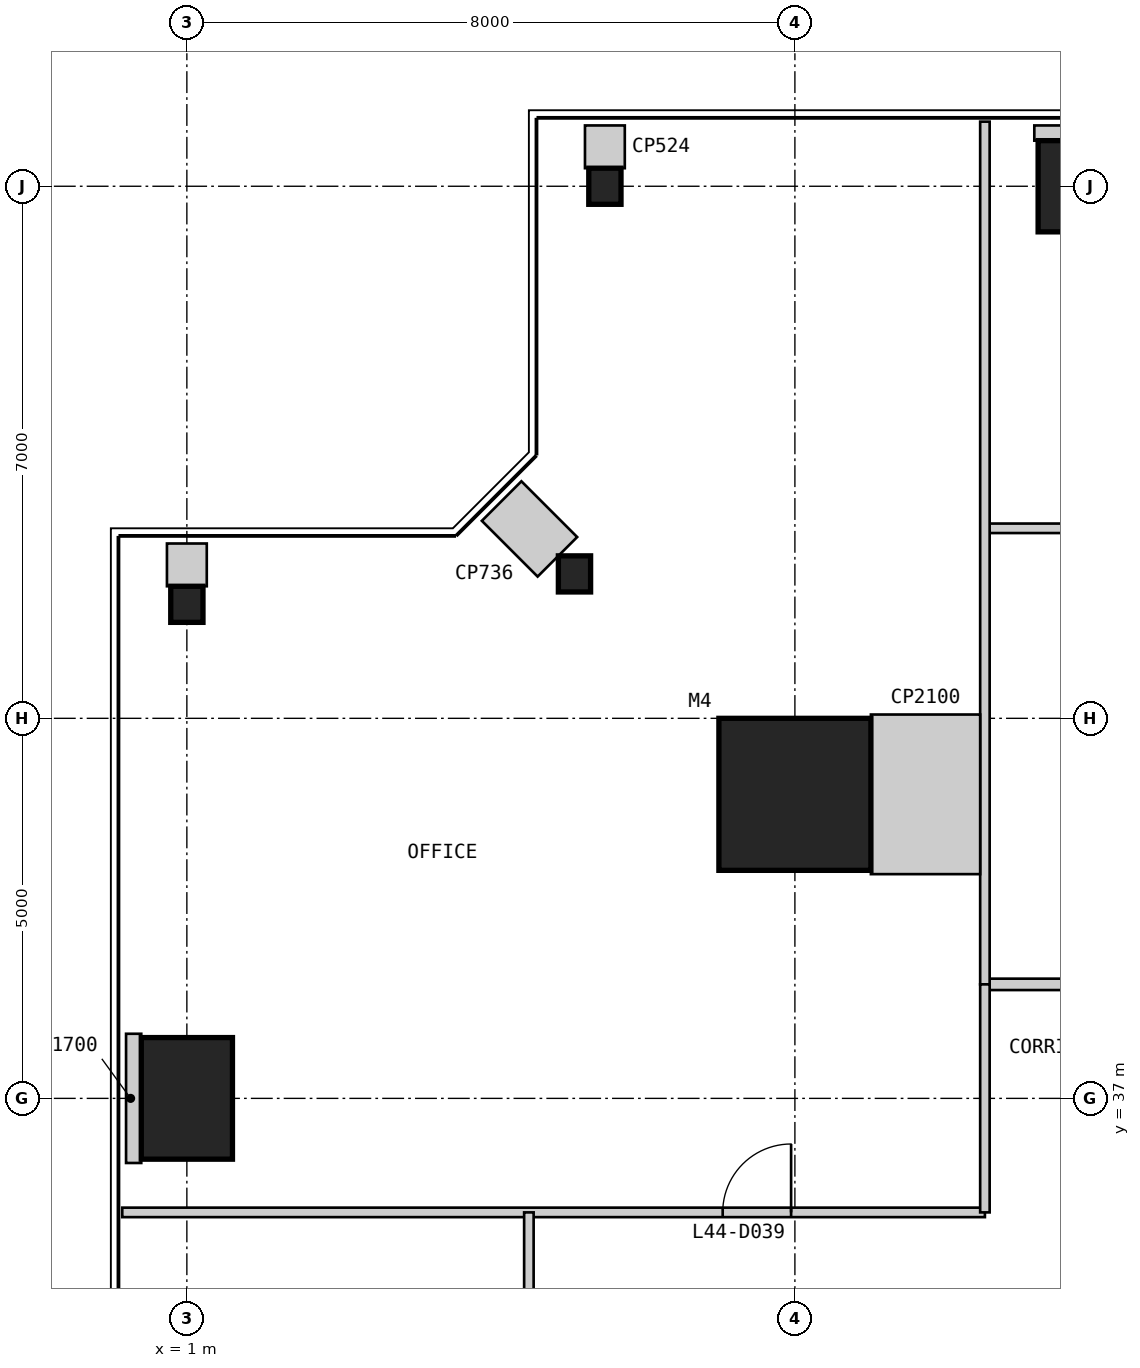
"""IFC4 building model, lengths in metres.
Left out: names, types, materials, properties, quantities, classifications, styles, units other than length and angle.
Written with IfcOpenShell. Run it as: python <this file> out.ifc"""

import sys

from ifc_helpers import new_model, si_unit, direction, frame, frame_2d, origin, origin_2d, place, context, subcontext, project, spatial, rectangle, i_section, extrude, element, fill, save


model = new_model("IFC4")
c1 = context("Model", 3, precision=1e-05, world=origin(), true_north=direction((0.0, 1.0)))
c2 = subcontext(c1, "Body", "Model", "MODEL_VIEW")
j1 = project(units=[si_unit("LENGTHUNIT", "METRE"), si_unit("PLANEANGLEUNIT", "RADIAN")], contexts=[c1])
p1 = place(None, origin())
s1 = spatial("IfcSite", under=j1, at=p1, CompositionType="ELEMENT")
p2 = place(p1, origin())
s2 = spatial("IfcBuilding", under=s1, at=p2, CompositionType="ELEMENT")
p3 = place(p2, frame((0.0, 0.0, 189.8)))
s3 = spatial("IfcBuildingStorey", under=s2, at=p3, CompositionType="ELEMENT", Elevation=189.8)
p4 = place(p3, frame((9.0, 41.0, 0.0), z_axis=(0.0, 0.0, 1.0), x_axis=(1.0, 0.0, 0.0)))
e1 = element("IfcColumn", 1, at=p4, inside=s3, PredefinedType="COLUMN", context=c2, shape_type="SweptSolid", body=[
    extrude(rectangle(XDim=2.0, YDim=2.0, at=origin_2d()), origin(), (0.0, 0.0, 1.0), 4.0),
])
p5 = place(p3, frame((13.0, 49.0, 0.0), z_axis=(0.0, 0.0, 1.0), x_axis=(1.0, 0.0, 0.0)))
e2 = element("IfcColumn", 2, at=p5, inside=s3, PredefinedType="COLUMN", context=c2, shape_type="SweptSolid", body=[
    extrude(rectangle(XDim=1.6, YDim=1.2, at=origin_2d()), origin(), (0.0, 0.0, 1.0), 4.0),
])
for number, where, z_axis, x_axis in (
    (3, (6.5, 49.0, 0.0), (0.0, 0.0, 1.0), (1.0, 0.0, 0.0)),
    (4, (6.1, 43.9, 0.0), (0.0, 0.0, 1.0), (1.0, 0.0, 0.0)),
    (5, (1.0, 43.5, 0.0), (0.0, 0.0, 1.0), (1.0, 0.0, 0.0)),
):
    element("IfcColumn", number, at=place(p3, frame(where, z_axis=z_axis, x_axis=x_axis)), inside=s3, PredefinedType="COLUMN", context=c2, shape_type="SweptSolid", body=[
        extrude(i_section(OverallWidth=0.424, OverallDepth=0.475, WebThickness=0.048, FlangeThickness=0.077, at=origin_2d()), origin(), (0.0, 0.0, 1.0), 4.0),
    ])
p6 = place(p3, frame((1.0, 37.0, 0.0), z_axis=(0.0, 0.0, 1.0), x_axis=(1.0, 0.0, 0.0)))
e6 = element("IfcColumn", 6, at=p6, inside=s3, PredefinedType="COLUMN", context=c2, shape_type="SweptSolid", body=[
    extrude(rectangle(XDim=1.2, YDim=1.6, at=origin_2d()), origin(), (0.0, 0.0, 1.0), 4.0),
])
p7 = place(p3, frame((38.5, 38.5, 0.0), z_axis=(0.0, 0.0, 1.0), x_axis=(-1.0, 0.0, 0.0)))
e7 = element("IfcWall", 7, at=p7, inside=s3, PredefinedType="PARTITIONING", context=c2, shape_type="SweptSolid", body=[
    extrude(rectangle(XDim=27.0, YDim=0.15, at=frame_2d((13.5, 0.0))), origin(), (0.0, 0.0, 1.0), 3.85),
])
p8 = place(p7, frame((13.0, 0.0, 0.0)))
e8 = element("IfcOpeningElement", 8, at=p8, cuts=e7, PredefinedType="OPENING", context=c2, shape_type="SweptSolid", body=[
    extrude(rectangle(XDim=1.0, YDim=2.2, at=frame_2d((0.5, 1.1))), frame((0.0, 0.085, 0.0), z_axis=(0.0, -1.0, 0.0), x_axis=(1.0, 0.0, 0.0)), (0.0, 0.0, 1.0), 0.17),
])
p9 = place(p3, frame((35.5, 44.5, 0.0), z_axis=(0.0, 0.0, 1.0), x_axis=(-1.0, 0.0, 0.0)))
e9 = element("IfcWall", 9, at=p9, inside=s3, PredefinedType="PARTITIONING", context=c2, shape_type="SweptSolid", body=[
    extrude(rectangle(XDim=24.0, YDim=0.125, at=frame_2d((12.0, 0.0))), origin(), (0.0, 0.0, 1.0), 3.85),
])
p10 = place(p9, frame((4.05, 0.0, 0.0)))
e10 = element("IfcOpeningElement", 10, at=p10, cuts=e9, PredefinedType="OPENING", context=c2, shape_type="SweptSolid", body=[
    extrude(rectangle(XDim=0.9, YDim=2.2, at=frame_2d((0.45, 1.1))), frame((0.0, 0.073, 0.0), z_axis=(0.0, -1.0, 0.0), x_axis=(1.0, 0.0, 0.0)), (0.0, 0.0, 1.0), 0.145),
])
p11 = place(p9, frame((10.05, 0.0, 0.0)))
e11 = element("IfcOpeningElement", 11, at=p11, cuts=e9, PredefinedType="OPENING", context=c2, shape_type="SweptSolid", body=[
    extrude(rectangle(XDim=0.9, YDim=2.2, at=frame_2d((0.45, 1.1))), frame((0.0, 0.073, 0.0), z_axis=(0.0, -1.0, 0.0), x_axis=(1.0, 0.0, 0.0)), (0.0, 0.0, 1.0), 0.145),
])
p12 = place(p9, frame((16.05, 0.0, 0.0)))
e12 = element("IfcOpeningElement", 12, at=p12, cuts=e9, PredefinedType="OPENING", context=c2, shape_type="SweptSolid", body=[
    extrude(rectangle(XDim=0.9, YDim=2.2, at=frame_2d((0.45, 1.1))), frame((0.0, 0.073, 0.0), z_axis=(0.0, -1.0, 0.0), x_axis=(1.0, 0.0, 0.0)), (0.0, 0.0, 1.0), 0.145),
])
p13 = place(p9, frame((19.05, 0.0, 0.0)))
e13 = element("IfcOpeningElement", 13, at=p13, cuts=e9, PredefinedType="OPENING", context=c2, shape_type="SweptSolid", body=[
    extrude(rectangle(XDim=0.9, YDim=2.2, at=frame_2d((0.45, 1.1))), frame((0.0, 0.073, 0.0), z_axis=(0.0, -1.0, 0.0), x_axis=(1.0, 0.0, 0.0)), (0.0, 0.0, 1.0), 0.145),
])
p14 = place(p3, frame((11.5, 49.85, 0.0), z_axis=(0.0, 0.0, 1.0), x_axis=(0.0, -1.0, 0.0)))
e14 = element("IfcWall", 14, at=p14, inside=s3, PredefinedType="PARTITIONING", context=c2, shape_type="SweptSolid", body=[
    extrude(rectangle(XDim=11.35, YDim=0.125, at=frame_2d((5.675, 0.0))), origin(), (0.0, 0.0, 1.0), 3.85),
])
p15 = place(p3, frame((0.15, 35.5, 0.0), z_axis=(0.0, 0.0, 1.0), x_axis=(1.0, 0.0, 0.0)))
e15 = element("IfcWall", 15, at=p15, inside=s3, PredefinedType="PARTITIONING", context=c2, shape_type="SweptSolid", body=[
    extrude(rectangle(XDim=11.35, YDim=0.125, at=frame_2d((5.675, 0.0))), origin(), (0.0, 0.0, 1.0), 3.85),
])
p16 = place(p15, frame((7.9, 0.0, 0.0)))
e16 = element("IfcOpeningElement", 16, at=p16, cuts=e15, PredefinedType="OPENING", context=c2, shape_type="SweptSolid", body=[
    extrude(rectangle(XDim=0.9, YDim=2.2, at=frame_2d((0.45, 1.1))), frame((0.0, 0.073, 0.0), z_axis=(0.0, -1.0, 0.0), x_axis=(1.0, 0.0, 0.0)), (0.0, 0.0, 1.0), 0.145),
])
p17 = place(p3, frame((5.5, 35.5, 0.0), z_axis=(0.0, 0.0, 1.0), x_axis=(0.0, -1.0, 0.0)))
e17 = element("IfcWall", 17, at=p17, inside=s3, PredefinedType="PARTITIONING", context=c2, shape_type="SweptSolid", body=[
    extrude(rectangle(XDim=24.0, YDim=0.125, at=frame_2d((12.0, 0.0))), origin(), (0.0, 0.0, 1.0), 3.85),
])
p18 = place(p17, frame((4.05, 0.0, 0.0)))
e18 = element("IfcOpeningElement", 18, at=p18, cuts=e17, PredefinedType="OPENING", context=c2, shape_type="SweptSolid", body=[
    extrude(rectangle(XDim=0.9, YDim=2.2, at=frame_2d((0.45, 1.1))), frame((0.0, 0.073, 0.0), z_axis=(0.0, -1.0, 0.0), x_axis=(1.0, 0.0, 0.0)), (0.0, 0.0, 1.0), 0.145),
])
p19 = place(p17, frame((10.05, 0.0, 0.0)))
e19 = element("IfcOpeningElement", 19, at=p19, cuts=e17, PredefinedType="OPENING", context=c2, shape_type="SweptSolid", body=[
    extrude(rectangle(XDim=0.9, YDim=2.2, at=frame_2d((0.45, 1.1))), frame((0.0, 0.073, 0.0), z_axis=(0.0, -1.0, 0.0), x_axis=(1.0, 0.0, 0.0)), (0.0, 0.0, 1.0), 0.145),
])
p20 = place(p17, frame((16.05, 0.0, 0.0)))
e20 = element("IfcOpeningElement", 20, at=p20, cuts=e17, PredefinedType="OPENING", context=c2, shape_type="SweptSolid", body=[
    extrude(rectangle(XDim=0.9, YDim=2.2, at=frame_2d((0.45, 1.1))), frame((0.0, 0.073, 0.0), z_axis=(0.0, -1.0, 0.0), x_axis=(1.0, 0.0, 0.0)), (0.0, 0.0, 1.0), 0.145),
])
p21 = place(p17, frame((19.05, 0.0, 0.0)))
e21 = element("IfcOpeningElement", 21, at=p21, cuts=e17, PredefinedType="OPENING", context=c2, shape_type="SweptSolid", body=[
    extrude(rectangle(XDim=0.9, YDim=2.2, at=frame_2d((0.45, 1.1))), frame((0.0, 0.073, 0.0), z_axis=(0.0, -1.0, 0.0), x_axis=(1.0, 0.0, 0.0)), (0.0, 0.0, 1.0), 0.145),
])
p22 = place(p3, frame((11.5, 38.5, 0.0), z_axis=(0.0, 0.0, 1.0), x_axis=(0.0, -1.0, 0.0)))
e22 = element("IfcWall", 22, at=p22, inside=s3, PredefinedType="PARTITIONING", context=c2, shape_type="SweptSolid", body=[
    extrude(rectangle(XDim=3.0, YDim=0.125, at=frame_2d((1.5, 0.0))), origin(), (0.0, 0.0, 1.0), 3.85),
])
p23 = place(p3, frame((13.0, 49.8, 0.0), z_axis=(0.0, 0.0, 1.0), x_axis=(0.0, -1.0, 0.0)))
e23 = element("IfcWall", 23, at=p23, inside=s3, PredefinedType="PARTITIONING", context=c2, shape_type="SweptSolid", body=[
    extrude(rectangle(XDim=0.2, YDim=1.7, at=frame_2d((0.1, 0.0))), origin(), (0.0, 0.0, 1.0), 3.85),
])
p24 = place(p3, frame((11.438, 41.0, 0.0), z_axis=(0.0, 0.0, 1.0), x_axis=(-1.0, 0.0, 0.0)))
e24 = element("IfcWall", 24, at=p24, inside=s3, PredefinedType="PARTITIONING", context=c2, shape_type="SweptSolid", body=[
    extrude(rectangle(XDim=1.438, YDim=2.1, at=frame_2d((0.719, 0.0))), origin(), (0.0, 0.0, 1.0), 3.85),
])
p25 = place(p3, frame((6.5, 49.8, 0.0), z_axis=(0.0, 0.0, 1.0), x_axis=(0.0, -1.0, 0.0)))
e25 = element("IfcWall", 25, at=p25, inside=s3, PredefinedType="PARTITIONING", context=c2, shape_type="SweptSolid", body=[
    extrude(rectangle(XDim=0.562, YDim=0.524, at=frame_2d((0.281, 0.0))), origin(), (0.0, 0.0, 1.0), 3.85),
])
p26 = place(p3, frame((5.141, 44.859, 0.0), z_axis=(0.0, 0.0, 1.0), x_axis=(0.707106781187, -0.707106781187, 0.0)))
e26 = element("IfcWall", 26, at=p26, inside=s3, PredefinedType="PARTITIONING", context=c2, shape_type="SweptSolid", body=[
    extrude(rectangle(XDim=1.038, YDim=0.736, at=frame_2d((0.519, 0.0))), origin(), (0.0, 0.0, 1.0), 3.85),
])
p27 = place(p3, frame((1.0, 44.3, 0.0), z_axis=(0.0, 0.0, 1.0), x_axis=(0.0, -1.0, 0.0)))
e27 = element("IfcWall", 27, at=p27, inside=s3, PredefinedType="PARTITIONING", context=c2, shape_type="SweptSolid", body=[
    extrude(rectangle(XDim=0.562, YDim=0.524, at=frame_2d((0.281, 0.0))), origin(), (0.0, 0.0, 1.0), 3.85),
])
p28 = place(p3, frame((0.2, 37.0, 0.0), z_axis=(0.0, 0.0, 1.0), x_axis=(1.0, 0.0, 0.0)))
e28 = element("IfcWall", 28, at=p28, inside=s3, PredefinedType="PARTITIONING", context=c2, shape_type="SweptSolid", body=[
    extrude(rectangle(XDim=0.2, YDim=1.7, at=frame_2d((0.1, 0.0))), origin(), (0.0, 0.0, 1.0), 3.85),
])
p29 = place(p16, origin())
e29 = element("IfcDoor", 29, at=p29, inside=s3, OperationType="SINGLE_SWING_RIGHT", PredefinedType="DOOR", context=c2, shape_type="SweptSolid", body=[
    extrude(rectangle(XDim=0.9, YDim=2.2, at=frame_2d((0.45, 1.1))), frame((0.0, 0.025, 0.0), z_axis=(0.0, -1.0, 0.0), x_axis=(1.0, 0.0, 0.0)), (0.0, 0.0, 1.0), 0.05),
])
fill(e16, e29)
save(model, sys.argv[1])
